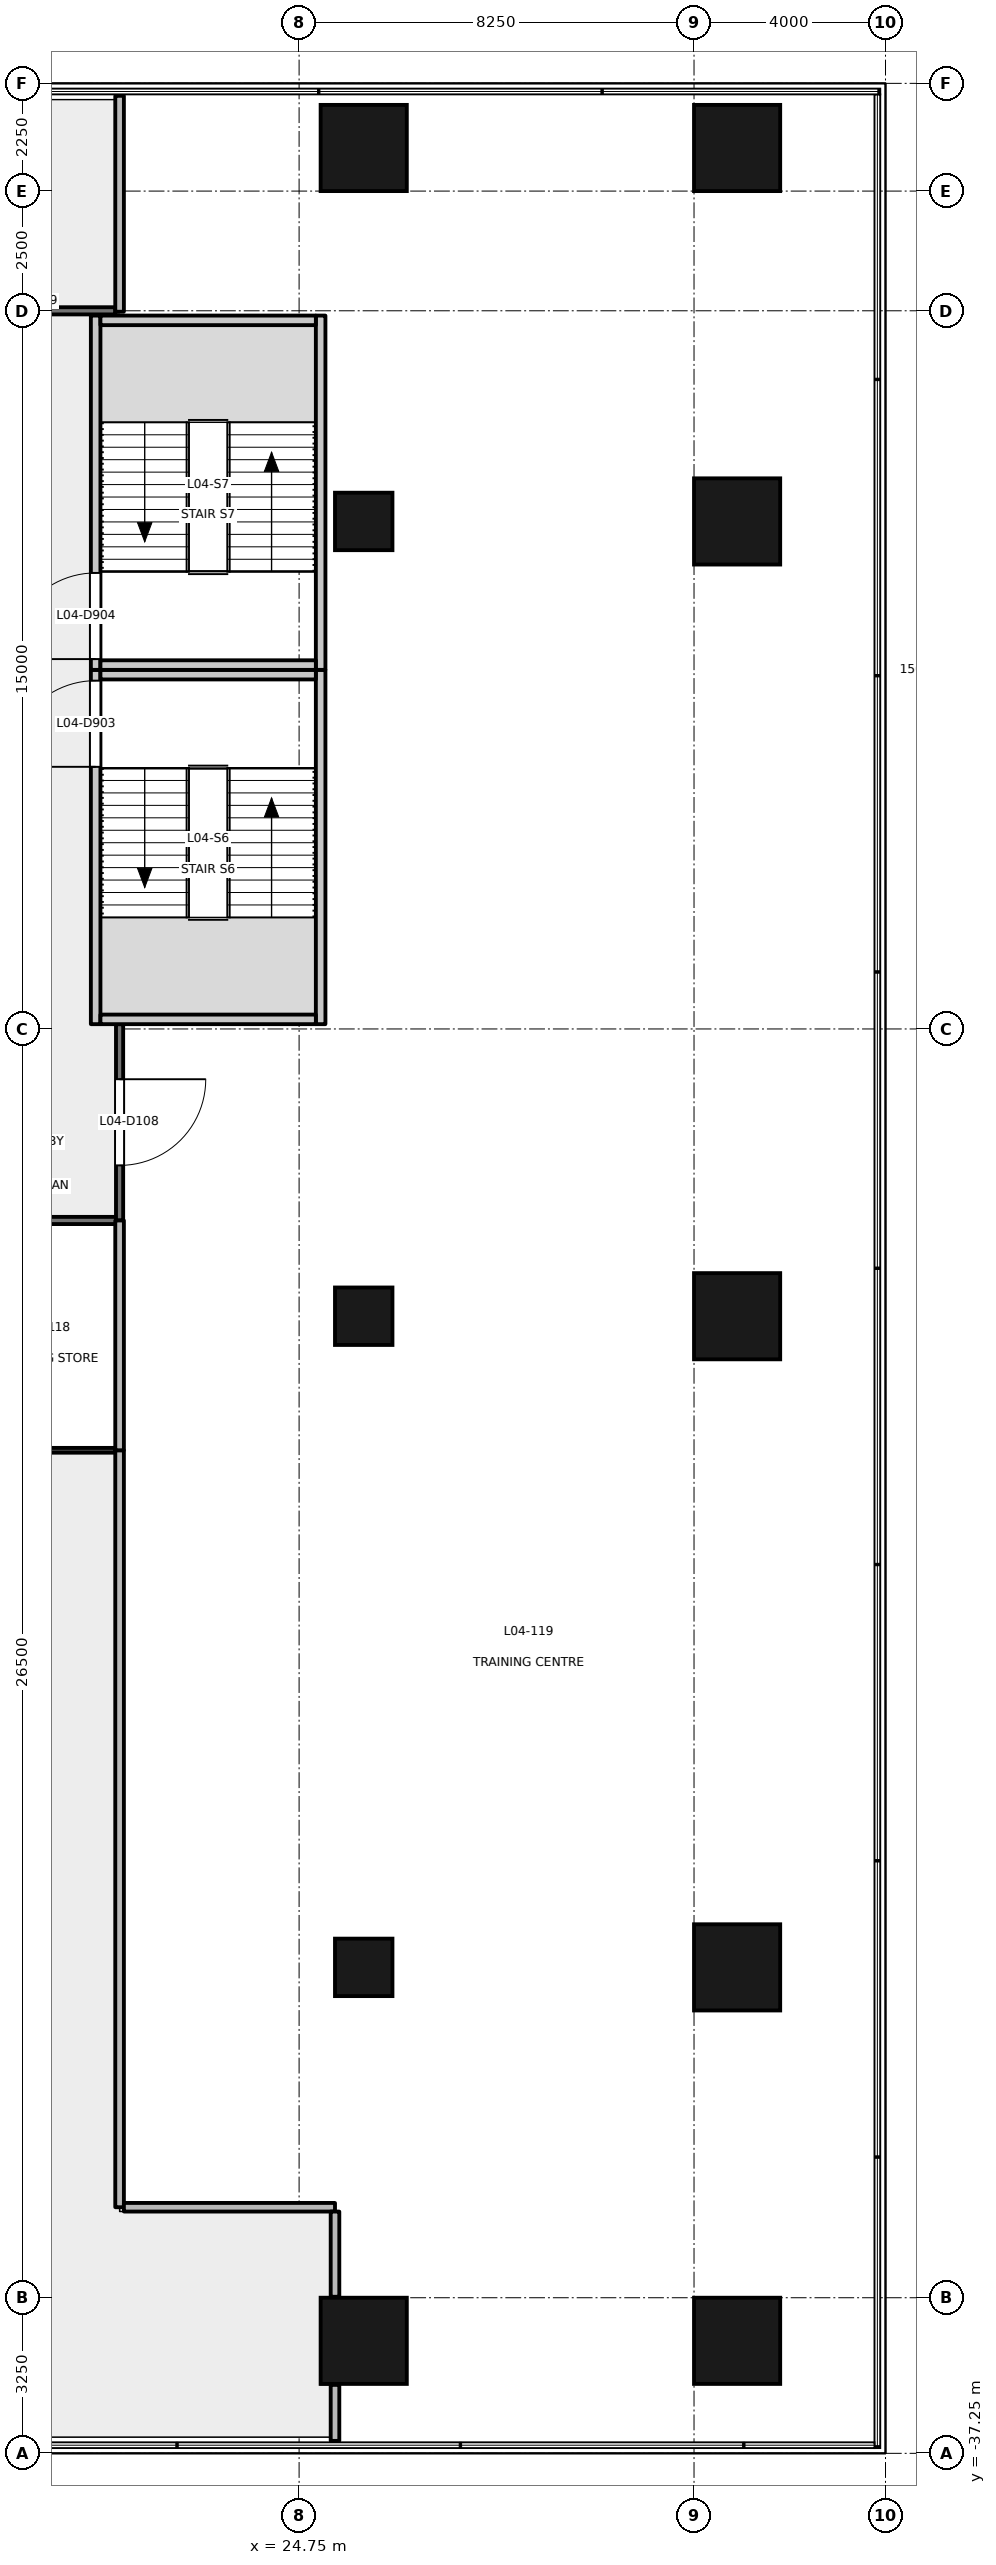
"""IFC4 building model, lengths in metres.
Left out: names, types, materials, properties, quantities, classifications, styles, units other than length and angle.
Written with IfcOpenShell. Run it as: python <this file> out.ifc"""

import sys

from ifc_helpers import new_model, si_unit, direction, frame, frame_2d, origin, origin_2d, place, context, subcontext, project, spatial, rectangle, extrude, element, fill, save


model = new_model("IFC4")
c1 = context("Model", 3, precision=1e-05, world=origin(), true_north=direction((0.0, 1.0)))
c2 = subcontext(c1, "Body", "Model", "MODEL_VIEW")
j1 = project(units=[si_unit("LENGTHUNIT", "METRE"), si_unit("PLANEANGLEUNIT", "RADIAN")], contexts=[c1])
p1 = place(None, origin())
s1 = spatial("IfcSite", under=j1, at=p1, CompositionType="ELEMENT")
p2 = place(p1, origin())
s2 = spatial("IfcBuilding", under=s1, at=p2, CompositionType="ELEMENT")
p3 = place(p2, frame((0.0, 0.0, 22.2)))
s3 = spatial("IfcBuildingStorey", under=s2, at=p3, CompositionType="ELEMENT", Elevation=22.2)
for number, where, z_axis, x_axis in (
    (1, (33.9, -34.9, -0.2), (0.0, 0.0, 1.0), (1.0, 0.0, 0.0)),
    (2, (33.9, 10.9, -0.2), (0.0, 0.0, 1.0), (1.0, 0.0, 0.0)),
    (3, (26.1, -34.9, -0.2), (0.0, 0.0, 1.0), (1.0, 0.0, 0.0)),
    (4, (33.9, -27.1, -0.2), (0.0, 0.0, 1.0), (0.0, 1.0, 0.0)),
    (5, (33.9, -13.5, -0.2), (0.0, 0.0, 1.0), (0.0, 1.0, 0.0)),
    (6, (33.9, 3.1, -0.2), (0.0, 0.0, 1.0), (0.0, 1.0, 0.0)),
    (7, (26.1, 10.9, -0.2), (0.0, 0.0, 1.0), (1.0, 0.0, 0.0)),
):
    element("IfcColumn", number, at=place(p3, frame(where, z_axis=z_axis, x_axis=x_axis)), inside=s3, PredefinedType="COLUMN", context=c2, shape_type="SweptSolid", body=[
        extrude(rectangle(XDim=1.8, YDim=1.8, at=origin_2d()), origin(), (0.0, 0.0, 1.0), 4.8),
    ])
for number, where, z_axis, x_axis in (
    (8, (26.1, -27.1, -0.2), (0.0, 0.0, 1.0), (1.0, 0.0, 0.0)),
    (9, (26.1, -13.5, -0.2), (0.0, 0.0, 1.0), (1.0, 0.0, 0.0)),
    (10, (26.1, 3.1, -0.2), (0.0, 0.0, 1.0), (1.0, 0.0, 0.0)),
):
    element("IfcColumn", number, at=place(p3, frame(where, z_axis=z_axis, x_axis=x_axis)), inside=s3, PredefinedType="COLUMN", context=c2, shape_type="SweptSolid", body=[
        extrude(rectangle(XDim=1.2, YDim=1.2, at=origin_2d()), origin(), (0.0, 0.0, 1.0), 4.8),
    ])
p4 = place(p3, frame((20.5, -7.4, -0.2), z_axis=(0.0, 0.0, 1.0), x_axis=(0.0, 1.0, 0.0)))
e11 = element("IfcWall", 11, at=p4, inside=s3, PredefinedType="SHEAR", context=c2, shape_type="SweptSolid", body=[
    extrude(rectangle(XDim=7.4, YDim=0.2, at=frame_2d((3.7, 0.0))), origin(), (0.0, 0.0, 1.0), 4.8),
])
p5 = place(p4, frame((5.375, 0.0, 0.2)))
e12 = element("IfcOpeningElement", 12, at=p5, cuts=e11, PredefinedType="OPENING", context=c2, shape_type="SweptSolid", body=[
    extrude(rectangle(XDim=1.8, YDim=2.1, at=frame_2d((0.9, 1.05))), frame((0.0, 0.111, 0.0), z_axis=(0.0, -1.0, 0.0), x_axis=(1.0, 0.0, 0.0)), (0.0, 0.0, 1.0), 0.221),
])
p6 = place(p3, frame((25.2, -7.4, -0.2), z_axis=(0.0, 0.0, 1.0), x_axis=(0.0, 1.0, 0.0)))
e13 = element("IfcWall", 13, at=p6, inside=s3, PredefinedType="SHEAR", context=c2, shape_type="SweptSolid", body=[
    extrude(rectangle(XDim=7.4, YDim=0.2, at=frame_2d((3.7, 0.0))), origin(), (0.0, 0.0, 1.0), 4.8),
])
for number, where, z_axis, x_axis in (
    (14, (20.6, -0.1, -0.2), (0.0, 0.0, 1.0), (1.0, 0.0, 0.0)),
    (15, (20.6, -7.3, -0.2), (0.0, 0.0, 1.0), (1.0, 0.0, 0.0)),
):
    element("IfcWall", number, at=place(p3, frame(where, z_axis=z_axis, x_axis=x_axis)), inside=s3, PredefinedType="SHEAR", context=c2, shape_type="SweptSolid", body=[
        extrude(rectangle(XDim=4.5, YDim=0.2, at=frame_2d((2.25, 0.0))), origin(), (0.0, 0.0, 1.0), 4.8),
    ])
p7 = place(p3, frame((20.5, 0.0, -0.2), z_axis=(0.0, 0.0, 1.0), x_axis=(0.0, 1.0, 0.0)))
e16 = element("IfcWall", 16, at=p7, inside=s3, PredefinedType="SHEAR", context=c2, shape_type="SweptSolid", body=[
    extrude(rectangle(XDim=7.4, YDim=0.2, at=frame_2d((3.7, 0.0))), origin(), (0.0, 0.0, 1.0), 4.8),
])
p8 = place(p7, frame((0.225, 0.0, 0.2)))
e17 = element("IfcOpeningElement", 17, at=p8, cuts=e16, PredefinedType="OPENING", context=c2, shape_type="SweptSolid", body=[
    extrude(rectangle(XDim=1.8, YDim=2.1, at=frame_2d((0.9, 1.05))), frame((0.0, 0.111, 0.0), z_axis=(0.0, -1.0, 0.0), x_axis=(1.0, 0.0, 0.0)), (0.0, 0.0, 1.0), 0.221),
])
p9 = place(p3, frame((25.2, 0.0, -0.2), z_axis=(0.0, 0.0, 1.0), x_axis=(0.0, 1.0, 0.0)))
e18 = element("IfcWall", 18, at=p9, inside=s3, PredefinedType="SHEAR", context=c2, shape_type="SweptSolid", body=[
    extrude(rectangle(XDim=7.4, YDim=0.2, at=frame_2d((3.7, 0.0))), origin(), (0.0, 0.0, 1.0), 4.8),
])
for number, where, z_axis, x_axis in (
    (19, (20.6, 7.3, -0.2), (0.0, 0.0, 1.0), (1.0, 0.0, 0.0)),
    (20, (20.6, 0.1, -0.2), (0.0, 0.0, 1.0), (1.0, 0.0, 0.0)),
):
    element("IfcWall", number, at=place(p3, frame(where, z_axis=z_axis, x_axis=x_axis)), inside=s3, PredefinedType="SHEAR", context=c2, shape_type="SweptSolid", body=[
        extrude(rectangle(XDim=4.5, YDim=0.2, at=frame_2d((2.25, 0.0))), origin(), (0.0, 0.0, 1.0), 4.8),
    ])
p10 = place(p3, frame((20.925, -11.5, 0.0), z_axis=(0.0, 0.0, 1.0), x_axis=(-1.0, 0.0, 0.0)))
e21 = element("IfcWall", 21, at=p10, inside=s3, PredefinedType="PARTITIONING", context=c2, shape_type="SweptSolid", body=[
    extrude(rectangle(XDim=2.965, YDim=0.15, at=frame_2d((1.482, 0.0))), origin(), (0.0, 0.0, 1.0), 3.2),
])
p11 = place(p3, frame((21.0, -7.4, 0.0), z_axis=(0.0, 0.0, 1.0), x_axis=(0.0, -1.0, 0.0)))
e22 = element("IfcWall", 22, at=p11, inside=s3, PredefinedType="PARTITIONING", context=c2, shape_type="SweptSolid", body=[
    extrude(rectangle(XDim=4.1, YDim=0.15, at=frame_2d((2.05, 0.0))), origin(), (0.0, 0.0, 1.0), 4.0),
])
p12 = place(p11, frame((1.15, 0.0, 0.0)))
e23 = element("IfcOpeningElement", 23, at=p12, cuts=e22, PredefinedType="OPENING", context=c2, shape_type="SweptSolid", body=[
    extrude(rectangle(XDim=1.8, YDim=2.1, at=frame_2d((0.9, 1.05))), frame((0.0, 0.085, 0.0), z_axis=(0.0, -1.0, 0.0), x_axis=(1.0, 0.0, 0.0)), (0.0, 0.0, 1.0), 0.171),
])
p13 = place(p3, frame((18.0, 7.499, 0.0), z_axis=(0.0, 0.0, 1.0), x_axis=(1.0, 0.0, 0.0)))
e24 = element("IfcWall", 24, at=p13, inside=s3, PredefinedType="PARTITIONING", context=c2, shape_type="SweptSolid", body=[
    extrude(rectangle(XDim=2.91, YDim=0.15, at=frame_2d((1.455, 0.0))), origin(), (0.0, 0.0, 1.0), 4.6),
])
p14 = place(p13, frame((0.628, 0.0, 0.0)))
e25 = element("IfcOpeningElement", 25, at=p14, cuts=e24, PredefinedType="OPENING", context=c2, shape_type="SweptSolid", body=[
    extrude(rectangle(XDim=0.9, YDim=2.1, at=frame_2d((0.45, 1.05))), frame((0.0, 0.085, 0.0), z_axis=(0.0, -1.0, 0.0), x_axis=(1.0, 0.0, 0.0)), (0.0, 0.0, 1.0), 0.171),
])
p15 = place(p3, frame((17.99, -16.3, 0.0), z_axis=(0.0, 0.0, 1.0), x_axis=(1.0, 0.0, 0.0)))
e26 = element("IfcWall", 26, at=p15, inside=s3, PredefinedType="PARTITIONING", context=c2, shape_type="SweptSolid", body=[
    extrude(rectangle(XDim=2.92, YDim=0.1, at=frame_2d((1.46, 0.0))), origin(), (0.0, 0.0, 1.0), 3.2),
])
p16 = place(p3, frame((21.0, -16.3, 0.0), z_axis=(0.0, 0.0, 1.0), x_axis=(0.0, -1.0, 0.0)))
e27 = element("IfcWall", 27, at=p16, inside=s3, PredefinedType="PARTITIONING", context=c2, shape_type="SweptSolid", body=[
    extrude(rectangle(XDim=15.81, YDim=0.18, at=frame_2d((7.905, 0.0))), origin(), (0.0, 0.0, 1.0), 4.0),
])
p17 = place(p3, frame((21.09, -32.11, 0.0), z_axis=(0.0, 0.0, 1.0), x_axis=(1.0, 0.0, 0.0)))
e28 = element("IfcWall", 28, at=p17, inside=s3, PredefinedType="PARTITIONING", context=c2, shape_type="SweptSolid", body=[
    extrude(rectangle(XDim=4.41, YDim=0.18, at=frame_2d((2.205, 0.0))), origin(), (0.0, 0.0, 1.0), 4.6),
])
p18 = place(p3, frame((25.5, -35.82, 0.0), z_axis=(0.0, 0.0, 1.0), x_axis=(0.0, -1.0, 0.0)))
e29 = element("IfcWall", 29, at=p18, inside=s3, PredefinedType="PARTITIONING", context=c2, shape_type="SweptSolid", body=[
    extrude(rectangle(XDim=1.17, YDim=0.18, at=frame_2d((0.585, 0.0))), origin(), (0.0, 0.0, 1.0), 4.6),
])
p19 = place(p3, frame((25.5, -32.2, 0.0), z_axis=(0.0, 0.0, 1.0), x_axis=(0.0, -1.0, 0.0)))
e30 = element("IfcWall", 30, at=p19, inside=s3, PredefinedType="PARTITIONING", context=c2, shape_type="SweptSolid", body=[
    extrude(rectangle(XDim=1.78, YDim=0.18, at=frame_2d((0.89, 0.0))), origin(), (0.0, 0.0, 1.0), 3.5),
])
p20 = place(p3, frame((21.0, -11.5, 0.0), z_axis=(0.0, 0.0, 1.0), x_axis=(0.0, -1.0, 0.0)))
e31 = element("IfcWall", 31, at=p20, inside=s3, PredefinedType="PARTITIONING", context=c2, shape_type="SweptSolid", body=[
    extrude(rectangle(XDim=4.8, YDim=0.18, at=frame_2d((2.4, 0.0))), origin(), (0.0, 0.0, 1.0), 4.0),
])
p21 = place(p3, frame((21.0, 7.48, 0.0), z_axis=(0.0, 0.0, 1.0), x_axis=(0.0, 1.0, 0.0)))
e32 = element("IfcWall", 32, at=p21, inside=s3, PredefinedType="PARTITIONING", context=c2, shape_type="SweptSolid", body=[
    extrude(rectangle(XDim=4.51, YDim=0.18, at=frame_2d((2.255, 0.0))), origin(), (0.0, 0.0, 1.0), 3.5),
])
p22 = place(p5, origin())
e33 = element("IfcDoor", 33, at=p22, inside=s3, OperationType="DOUBLE_DOOR_SINGLE_SWING", PredefinedType="DOOR", context=c2, shape_type="SweptSolid", body=[
    extrude(rectangle(XDim=1.8, YDim=2.1, at=frame_2d((0.9, 1.05))), frame((0.0, 0.025, 0.0), z_axis=(0.0, -1.0, 0.0), x_axis=(1.0, 0.0, 0.0)), (0.0, 0.0, 1.0), 0.05),
])
fill(e12, e33)
p23 = place(p8, origin())
e34 = element("IfcDoor", 34, at=p23, inside=s3, OperationType="DOUBLE_DOOR_SINGLE_SWING", PredefinedType="DOOR", context=c2, shape_type="SweptSolid", body=[
    extrude(rectangle(XDim=1.8, YDim=2.1, at=frame_2d((0.9, 1.05))), frame((0.0, 0.025, 0.0), z_axis=(0.0, -1.0, 0.0), x_axis=(1.0, 0.0, 0.0)), (0.0, 0.0, 1.0), 0.05),
])
fill(e17, e34)
p24 = place(p12, origin())
e35 = element("IfcDoor", 35, at=p24, inside=s3, OperationType="DOUBLE_DOOR_SINGLE_SWING", PredefinedType="DOOR", context=c2, shape_type="SweptSolid", body=[
    extrude(rectangle(XDim=1.8, YDim=2.1, at=frame_2d((0.9, 1.05))), frame((0.0, 0.025, 0.0), z_axis=(0.0, -1.0, 0.0), x_axis=(1.0, 0.0, 0.0)), (0.0, 0.0, 1.0), 0.05),
])
fill(e23, e35)
save(model, sys.argv[1])
